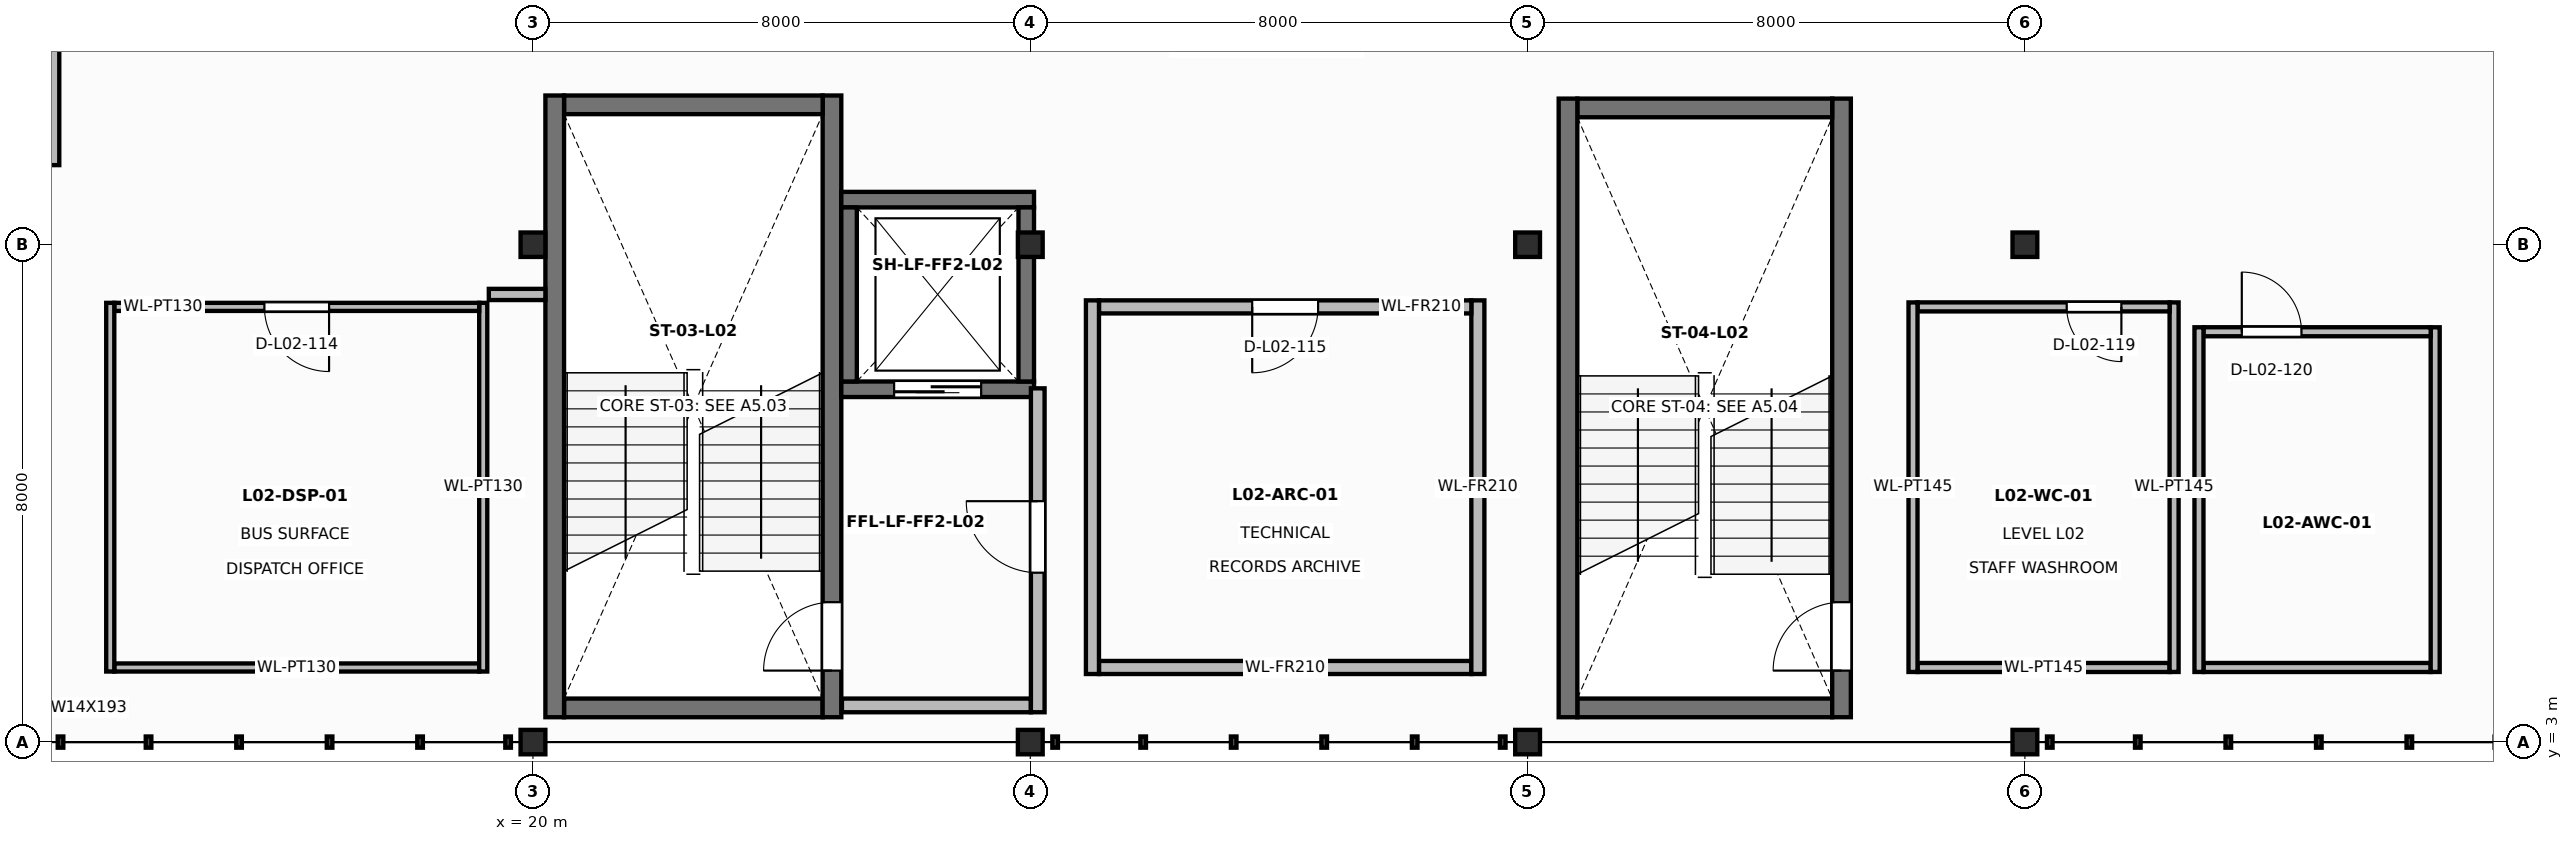
"""IFC4 building model, lengths in metres.
Left out: names, types, materials, properties, quantities, classifications, styles, units other than length and angle.
Written with IfcOpenShell. Run it as: python <this file> out.ifc"""

import sys

from ifc_helpers import new_model, si_unit, direction, frame, frame_2d, origin, origin_2d, place, context, subcontext, project, spatial, rectangle, i_section, extrude, element, fill, save


model = new_model("IFC4")
c1 = context("Model", 3, precision=1e-05, world=origin(), true_north=direction((0.0, 1.0)))
c2 = subcontext(c1, "Body", "Model", "MODEL_VIEW")
j1 = project(units=[si_unit("LENGTHUNIT", "METRE"), si_unit("PLANEANGLEUNIT", "RADIAN")], contexts=[c1])
p1 = place(None, origin())
s1 = spatial("IfcSite", under=j1, at=p1, CompositionType="ELEMENT")
p2 = place(p1, origin())
s2 = spatial("IfcBuilding", under=s1, at=p2, CompositionType="ELEMENT")
p3 = place(p2, frame((0.0, 0.0, 11.2)))
s3 = spatial("IfcBuildingStorey", under=s2, at=p3, CompositionType="ELEMENT", Elevation=11.2)
for number, where, z_axis, x_axis in (
    (1, (20.0, 3.0, 0.0), (0.0, 0.0, 1.0), (1.0, 0.0, 0.0)),
    (2, (20.0, 11.0, 0.0), (0.0, 0.0, 1.0), (1.0, 0.0, 0.0)),
    (3, (28.0, 3.0, 0.0), (0.0, 0.0, 1.0), (1.0, 0.0, 0.0)),
    (4, (28.0, 11.0, 0.0), (0.0, 0.0, 1.0), (1.0, 0.0, 0.0)),
    (5, (36.0, 3.0, 0.0), (0.0, 0.0, 1.0), (1.0, 0.0, 0.0)),
    (6, (36.0, 11.0, 0.0), (0.0, 0.0, 1.0), (1.0, 0.0, 0.0)),
    (7, (44.0, 3.0, 0.0), (0.0, 0.0, 1.0), (1.0, 0.0, 0.0)),
    (8, (44.0, 11.0, 0.0), (0.0, 0.0, 1.0), (1.0, 0.0, 0.0)),
):
    element("IfcColumn", number, at=place(p3, frame(where, z_axis=z_axis, x_axis=x_axis)), inside=s3, PredefinedType="COLUMN", context=c2, shape_type="SweptSolid", body=[
        extrude(i_section(OverallWidth=0.399, OverallDepth=0.393, WebThickness=0.023, FlangeThickness=0.037, at=origin_2d()), origin(), (0.0, 0.0, 1.0), 4.4),
    ])
p4 = place(p3, frame((20.5, 3.55, 0.0), z_axis=(0.0, 0.0, 1.0), x_axis=(1.0, 0.0, 0.0)))
e9 = element("IfcWall", 9, at=p4, inside=s3, PredefinedType="SHEAR", context=c2, shape_type="SweptSolid", body=[
    extrude(rectangle(XDim=4.16, YDim=0.3, at=frame_2d((2.08, 0.0))), origin(), (0.0, 0.0, 1.0), 4.165),
])
p5 = place(p3, frame((24.81, 3.4, 0.0), z_axis=(0.0, 0.0, 1.0), x_axis=(0.0, 1.0, 0.0)))
e10 = element("IfcWall", 10, at=p5, inside=s3, PredefinedType="SHEAR", context=c2, shape_type="SweptSolid", body=[
    extrude(rectangle(XDim=10.0, YDim=0.3, at=frame_2d((5.0, 0.0))), origin(), (0.0, 0.0, 1.0), 4.165),
])
p6 = place(p5, frame((0.75, 0.0, 0.0)))
e11 = element("IfcOpeningElement", 11, at=p6, cuts=e10, PredefinedType="OPENING", context=c2, shape_type="SweptSolid", body=[
    extrude(rectangle(XDim=1.1, YDim=2.15, at=frame_2d((0.55, 1.075))), frame((0.0, 0.16, 0.0), z_axis=(0.0, -1.0, 0.0), x_axis=(1.0, 0.0, 0.0)), (0.0, 0.0, 1.0), 0.32),
])
p7 = place(p3, frame((24.66, 13.25, 0.0), z_axis=(0.0, 0.0, 1.0), x_axis=(-1.0, 0.0, 0.0)))
e12 = element("IfcWall", 12, at=p7, inside=s3, PredefinedType="SHEAR", context=c2, shape_type="SweptSolid", body=[
    extrude(rectangle(XDim=4.16, YDim=0.3, at=frame_2d((2.08, 0.0))), origin(), (0.0, 0.0, 1.0), 4.165),
])
p8 = place(p3, frame((20.35, 13.4, 0.0), z_axis=(0.0, 0.0, 1.0), x_axis=(0.0, -1.0, 0.0)))
e13 = element("IfcWall", 13, at=p8, inside=s3, PredefinedType="SHEAR", context=c2, shape_type="SweptSolid", body=[
    extrude(rectangle(XDim=10.0, YDim=0.3, at=frame_2d((5.0, 0.0))), origin(), (0.0, 0.0, 1.0), 4.165),
])
p9 = place(p3, frame((36.8, 3.55, 0.0), z_axis=(0.0, 0.0, 1.0), x_axis=(1.0, 0.0, 0.0)))
e14 = element("IfcWall", 14, at=p9, inside=s3, PredefinedType="SHEAR", context=c2, shape_type="SweptSolid", body=[
    extrude(rectangle(XDim=4.1, YDim=0.3, at=frame_2d((2.05, 0.0))), origin(), (0.0, 0.0, 1.0), 4.165),
])
p10 = place(p3, frame((41.05, 3.4, 0.0), z_axis=(0.0, 0.0, 1.0), x_axis=(0.0, 1.0, 0.0)))
e15 = element("IfcWall", 15, at=p10, inside=s3, PredefinedType="SHEAR", context=c2, shape_type="SweptSolid", body=[
    extrude(rectangle(XDim=9.95, YDim=0.3, at=frame_2d((4.975, 0.0))), origin(), (0.0, 0.0, 1.0), 4.165),
])
p11 = place(p10, frame((0.75, 0.0, 0.0)))
e16 = element("IfcOpeningElement", 16, at=p11, cuts=e15, PredefinedType="OPENING", context=c2, shape_type="SweptSolid", body=[
    extrude(rectangle(XDim=1.1, YDim=2.15, at=frame_2d((0.55, 1.075))), frame((0.0, 0.16, 0.0), z_axis=(0.0, -1.0, 0.0), x_axis=(1.0, 0.0, 0.0)), (0.0, 0.0, 1.0), 0.32),
])
p12 = place(p3, frame((40.9, 13.2, 0.0), z_axis=(0.0, 0.0, 1.0), x_axis=(-1.0, 0.0, 0.0)))
e17 = element("IfcWall", 17, at=p12, inside=s3, PredefinedType="SHEAR", context=c2, shape_type="SweptSolid", body=[
    extrude(rectangle(XDim=4.1, YDim=0.3, at=frame_2d((2.05, 0.0))), origin(), (0.0, 0.0, 1.0), 4.165),
])
p13 = place(p3, frame((36.65, 13.35, 0.0), z_axis=(0.0, 0.0, 1.0), x_axis=(0.0, -1.0, 0.0)))
e18 = element("IfcWall", 18, at=p13, inside=s3, PredefinedType="SHEAR", context=c2, shape_type="SweptSolid", body=[
    extrude(rectangle(XDim=9.95, YDim=0.3, at=frame_2d((4.975, 0.0))), origin(), (0.0, 0.0, 1.0), 4.165),
])
p14 = place(p3, frame((12.27, 12.28, 0.0), z_axis=(0.0, 0.0, 1.0), x_axis=(0.0, 1.0, 0.0)))
e19 = element("IfcWall", 19, at=p14, inside=s3, PredefinedType="SOLIDWALL", context=c2, shape_type="SweptSolid", body=[
    extrude(rectangle(XDim=5.21, YDim=0.22, at=frame_2d((2.605, 0.0))), origin(), (0.0, 0.0, 1.0), 4.165),
])
p15 = place(p3, frame((24.96, 8.675, 0.0), z_axis=(0.0, 0.0, 1.0), x_axis=(1.0, 0.0, 0.0)))
e20 = element("IfcWall", 20, at=p15, inside=s3, PredefinedType="SOLIDWALL", context=c2, shape_type="SweptSolid", body=[
    extrude(rectangle(XDim=3.1, YDim=0.25, at=frame_2d((1.55, 0.0))), origin(), (0.0, 0.0, 1.0), 4.165),
])
p16 = place(p15, frame((0.85, 0.0, 0.0)))
e21 = element("IfcOpeningElement", 21, at=p16, cuts=e20, PredefinedType="OPENING", context=c2, shape_type="SweptSolid", body=[
    extrude(rectangle(XDim=1.4, YDim=2.25, at=frame_2d((0.7, 1.125))), frame((0.0, 0.135, 0.0), z_axis=(0.0, -1.0, 0.0), x_axis=(1.0, 0.0, 0.0)), (0.0, 0.0, 1.0), 0.27),
])
p17 = place(p3, frame((28.06, 11.725, 0.0), z_axis=(0.0, 0.0, 1.0), x_axis=(-1.0, 0.0, 0.0)))
e22 = element("IfcWall", 22, at=p17, inside=s3, PredefinedType="SOLIDWALL", context=c2, shape_type="SweptSolid", body=[
    extrude(rectangle(XDim=3.1, YDim=0.25, at=frame_2d((1.55, 0.0))), origin(), (0.0, 0.0, 1.0), 4.165),
])
for number, where, z_axis, x_axis in (
    (23, (27.935, 8.8, 0.0), (0.0, 0.0, 1.0), (0.0, 1.0, 0.0)),
    (24, (25.085, 11.6, 0.0), (0.0, 0.0, 1.0), (0.0, -1.0, 0.0)),
):
    element("IfcWall", number, at=place(p3, frame(where, z_axis=z_axis, x_axis=x_axis)), inside=s3, PredefinedType="SOLIDWALL", context=c2, shape_type="SweptSolid", body=[
        extrude(rectangle(XDim=2.8, YDim=0.25, at=frame_2d((1.4, 0.0))), origin(), (0.0, 0.0, 1.0), 4.165),
    ])
p18 = place(p3, frame((24.97, 3.59, 0.0), z_axis=(0.0, 0.0, 1.0), x_axis=(1.0, 0.0, 0.0)))
e25 = element("IfcWall", 25, at=p18, inside=s3, PredefinedType="SOLIDWALL", context=c2, shape_type="SweptSolid", body=[
    extrude(rectangle(XDim=3.04, YDim=0.22, at=frame_2d((1.52, 0.0))), origin(), (0.0, 0.0, 1.0), 4.165),
])
p19 = place(p3, frame((28.12, 3.48, 0.0), z_axis=(0.0, 0.0, 1.0), x_axis=(0.0, 1.0, 0.0)))
e26 = element("IfcWall", 26, at=p19, inside=s3, PredefinedType="SOLIDWALL", context=c2, shape_type="SweptSolid", body=[
    extrude(rectangle(XDim=5.21, YDim=0.22, at=frame_2d((2.605, 0.0))), origin(), (0.0, 0.0, 1.0), 3.547),
])
p20 = place(p19, frame((2.245, 0.0, 0.0)))
e27 = element("IfcOpeningElement", 27, at=p20, cuts=e26, PredefinedType="OPENING", context=c2, shape_type="SweptSolid", body=[
    extrude(rectangle(XDim=1.15, YDim=2.15, at=frame_2d((0.575, 1.075))), frame((0.0, 0.12, 0.0), z_axis=(0.0, -1.0, 0.0), x_axis=(1.0, 0.0, 0.0)), (0.0, 0.0, 1.0), 0.24),
])
p21 = place(p3, frame((19.29, 10.2, 0.0), z_axis=(0.0, 0.0, 1.0), x_axis=(1.0, 0.0, 0.0)))
e28 = element("IfcWall", 28, at=p21, inside=s3, PredefinedType="PARTITIONING", context=c2, shape_type="SweptSolid", body=[
    extrude(rectangle(XDim=0.91, YDim=0.18, at=frame_2d((0.455, 0.0))), origin(), (0.0, 0.0, 1.0), 3.547),
])
p22 = place(p3, frame((13.265, 4.2, 0.0), z_axis=(0.0, 0.0, 1.0), x_axis=(1.0, 0.0, 0.0)))
e29 = element("IfcWall", 29, at=p22, inside=s3, PredefinedType="PARTITIONING", context=c2, shape_type="SweptSolid", body=[
    extrude(rectangle(XDim=5.87, YDim=0.13, at=frame_2d((2.935, 0.0))), origin(), (0.0, 0.0, 1.0), 4.12),
])
p23 = place(p3, frame((19.2, 4.135, 0.0), z_axis=(0.0, 0.0, 1.0), x_axis=(0.0, 1.0, 0.0)))
e30 = element("IfcWall", 30, at=p23, inside=s3, PredefinedType="PARTITIONING", context=c2, shape_type="SweptSolid", body=[
    extrude(rectangle(XDim=5.93, YDim=0.13, at=frame_2d((2.965, 0.0))), origin(), (0.0, 0.0, 1.0), 4.12),
])
p24 = place(p3, frame((19.135, 10.0, 0.0), z_axis=(0.0, 0.0, 1.0), x_axis=(-1.0, 0.0, 0.0)))
e31 = element("IfcWall", 31, at=p24, inside=s3, PredefinedType="PARTITIONING", context=c2, shape_type="SweptSolid", body=[
    extrude(rectangle(XDim=5.87, YDim=0.13, at=frame_2d((2.935, 0.0))), origin(), (0.0, 0.0, 1.0), 4.12),
])
p25 = place(p24, frame((2.415, 0.0, 0.0)))
e32 = element("IfcOpeningElement", 32, at=p25, cuts=e31, PredefinedType="OPENING", context=c2, shape_type="SweptSolid", body=[
    extrude(rectangle(XDim=1.04, YDim=2.16, at=frame_2d((0.52, 1.08))), frame((0.0, 0.075, 0.0), z_axis=(0.0, -1.0, 0.0), x_axis=(1.0, 0.0, 0.0)), (0.0, 0.0, 1.0), 0.15),
])
p26 = place(p3, frame((13.2, 10.065, 0.0), z_axis=(0.0, 0.0, 1.0), x_axis=(0.0, -1.0, 0.0)))
e33 = element("IfcWall", 33, at=p26, inside=s3, PredefinedType="PARTITIONING", context=c2, shape_type="SweptSolid", body=[
    extrude(rectangle(XDim=5.93, YDim=0.13, at=frame_2d((2.965, 0.0))), origin(), (0.0, 0.0, 1.0), 4.12),
])
p27 = place(p3, frame((29.105, 4.2, 0.0), z_axis=(0.0, 0.0, 1.0), x_axis=(1.0, 0.0, 0.0)))
e34 = element("IfcWall", 34, at=p27, inside=s3, PredefinedType="SOLIDWALL", context=c2, shape_type="SweptSolid", body=[
    extrude(rectangle(XDim=5.99, YDim=0.21, at=frame_2d((2.995, 0.0))), origin(), (0.0, 0.0, 1.0), 4.12),
])
p28 = place(p3, frame((35.2, 4.095, 0.0), z_axis=(0.0, 0.0, 1.0), x_axis=(0.0, 1.0, 0.0)))
e35 = element("IfcWall", 35, at=p28, inside=s3, PredefinedType="SOLIDWALL", context=c2, shape_type="SweptSolid", body=[
    extrude(rectangle(XDim=6.01, YDim=0.21, at=frame_2d((3.005, 0.0))), origin(), (0.0, 0.0, 1.0), 3.811),
])
p29 = place(p3, frame((35.095, 10.0, 0.0), z_axis=(0.0, 0.0, 1.0), x_axis=(-1.0, 0.0, 0.0)))
e36 = element("IfcWall", 36, at=p29, inside=s3, PredefinedType="SOLIDWALL", context=c2, shape_type="SweptSolid", body=[
    extrude(rectangle(XDim=5.99, YDim=0.21, at=frame_2d((2.995, 0.0))), origin(), (0.0, 0.0, 1.0), 4.12),
])
p30 = place(p29, frame((2.465, 0.0, 0.0)))
e37 = element("IfcOpeningElement", 37, at=p30, cuts=e36, PredefinedType="OPENING", context=c2, shape_type="SweptSolid", body=[
    extrude(rectangle(XDim=1.06, YDim=2.16, at=frame_2d((0.53, 1.08))), frame((0.0, 0.115, 0.0), z_axis=(0.0, -1.0, 0.0), x_axis=(1.0, 0.0, 0.0)), (0.0, 0.0, 1.0), 0.23),
])
p31 = place(p3, frame((29.0, 10.105, 0.0), z_axis=(0.0, 0.0, 1.0), x_axis=(0.0, -1.0, 0.0)))
e38 = element("IfcWall", 38, at=p31, inside=s3, PredefinedType="SOLIDWALL", context=c2, shape_type="SweptSolid", body=[
    extrude(rectangle(XDim=6.01, YDim=0.21, at=frame_2d((3.005, 0.0))), origin(), (0.0, 0.0, 1.0), 3.811),
])
p32 = place(p3, frame((42.273, 4.2, 0.0), z_axis=(0.0, 0.0, 1.0), x_axis=(1.0, 0.0, 0.0)))
e39 = element("IfcWall", 39, at=p32, inside=s3, PredefinedType="PARTITIONING", context=c2, shape_type="SweptSolid", body=[
    extrude(rectangle(XDim=4.055, YDim=0.145, at=frame_2d((2.027, 0.0))), origin(), (0.0, 0.0, 1.0), 3.628),
])
p33 = place(p3, frame((46.4, 4.128, 0.0), z_axis=(0.0, 0.0, 1.0), x_axis=(0.0, 1.0, 0.0)))
e40 = element("IfcWall", 40, at=p33, inside=s3, PredefinedType="PARTITIONING", context=c2, shape_type="SweptSolid", body=[
    extrude(rectangle(XDim=5.944, YDim=0.145, at=frame_2d((2.972, 0.0))), origin(), (0.0, 0.0, 1.0), 3.811),
])
p34 = place(p3, frame((46.328, 10.0, 0.0), z_axis=(0.0, 0.0, 1.0), x_axis=(-1.0, 0.0, 0.0)))
e41 = element("IfcWall", 41, at=p34, inside=s3, PredefinedType="PARTITIONING", context=c2, shape_type="SweptSolid", body=[
    extrude(rectangle(XDim=4.055, YDim=0.145, at=frame_2d((2.027, 0.0))), origin(), (0.0, 0.0, 1.0), 3.628),
])
p35 = place(p34, frame((0.776, 0.0, 0.0)))
e42 = element("IfcOpeningElement", 42, at=p35, cuts=e41, PredefinedType="OPENING", context=c2, shape_type="SweptSolid", body=[
    extrude(rectangle(XDim=0.88, YDim=2.08, at=frame_2d((0.44, 1.04))), frame((0.0, 0.083, 0.0), z_axis=(0.0, -1.0, 0.0), x_axis=(1.0, 0.0, 0.0)), (0.0, 0.0, 1.0), 0.165),
])
p36 = place(p3, frame((42.2, 10.072, 0.0), z_axis=(0.0, 0.0, 1.0), x_axis=(0.0, -1.0, 0.0)))
e43 = element("IfcWall", 43, at=p36, inside=s3, PredefinedType="PARTITIONING", context=c2, shape_type="SweptSolid", body=[
    extrude(rectangle(XDim=5.944, YDim=0.145, at=frame_2d((2.972, 0.0))), origin(), (0.0, 0.0, 1.0), 4.12),
])
p37 = place(p3, frame((46.872, 4.2, 0.0), z_axis=(0.0, 0.0, 1.0), x_axis=(1.0, 0.0, 0.0)))
e44 = element("IfcWall", 44, at=p37, inside=s3, PredefinedType="PARTITIONING", context=c2, shape_type="SweptSolid", body=[
    extrude(rectangle(XDim=3.656, YDim=0.145, at=frame_2d((1.828, 0.0))), origin(), (0.0, 0.0, 1.0), 4.12),
])
p38 = place(p3, frame((50.6, 4.128, 0.0), z_axis=(0.0, 0.0, 1.0), x_axis=(0.0, 1.0, 0.0)))
e45 = element("IfcWall", 45, at=p38, inside=s3, PredefinedType="PARTITIONING", context=c2, shape_type="SweptSolid", body=[
    extrude(rectangle(XDim=5.544, YDim=0.145, at=frame_2d((2.772, 0.0))), origin(), (0.0, 0.0, 1.0), 3.811),
])
p39 = place(p3, frame((50.528, 9.6, 0.0), z_axis=(0.0, 0.0, 1.0), x_axis=(-1.0, 0.0, 0.0)))
e46 = element("IfcWall", 46, at=p39, inside=s3, PredefinedType="PARTITIONING", context=c2, shape_type="SweptSolid", body=[
    extrude(rectangle(XDim=3.656, YDim=0.145, at=frame_2d((1.828, 0.0))), origin(), (0.0, 0.0, 1.0), 4.12),
])
p40 = place(p39, frame((2.079, 0.0, 0.0)))
e47 = element("IfcOpeningElement", 47, at=p40, cuts=e46, PredefinedType="OPENING", context=c2, shape_type="SweptSolid", body=[
    extrude(rectangle(XDim=0.96, YDim=2.12, at=frame_2d((0.48, 1.06))), frame((0.0, 0.083, 0.0), z_axis=(0.0, -1.0, 0.0), x_axis=(1.0, 0.0, 0.0)), (0.0, 0.0, 1.0), 0.165),
])
p41 = place(p3, frame((46.8, 9.672, 0.0), z_axis=(0.0, 0.0, 1.0), x_axis=(0.0, -1.0, 0.0)))
e48 = element("IfcWall", 48, at=p41, inside=s3, PredefinedType="PARTITIONING", context=c2, shape_type="SweptSolid", body=[
    extrude(rectangle(XDim=5.544, YDim=0.145, at=frame_2d((2.772, 0.0))), origin(), (0.0, 0.0, 1.0), 3.811),
])
p42 = place(p6, origin())
e49 = element("IfcDoor", 49, at=p42, inside=s3, OperationType="SINGLE_SWING_LEFT", PredefinedType="DOOR", context=c2, shape_type="SweptSolid", body=[
    extrude(rectangle(XDim=1.1, YDim=2.15, at=frame_2d((0.55, 1.075))), frame((0.0, 0.025, 0.0), z_axis=(0.0, -1.0, 0.0), x_axis=(1.0, 0.0, 0.0)), (0.0, 0.0, 1.0), 0.05),
])
fill(e11, e49)
p43 = place(p11, origin())
e50 = element("IfcDoor", 50, at=p43, inside=s3, OperationType="SINGLE_SWING_LEFT", PredefinedType="DOOR", context=c2, shape_type="SweptSolid", body=[
    extrude(rectangle(XDim=1.1, YDim=2.15, at=frame_2d((0.55, 1.075))), frame((0.0, 0.025, 0.0), z_axis=(0.0, -1.0, 0.0), x_axis=(1.0, 0.0, 0.0)), (0.0, 0.0, 1.0), 0.05),
])
fill(e16, e50)
p44 = place(p16, frame((1.4, 0.0, 0.0), z_axis=(0.0, 0.0, 1.0), x_axis=(-1.0, 0.0, 0.0)))
e51 = element("IfcDoor", 51, at=p44, inside=s3, OperationType="DOUBLE_DOOR_SLIDING", PredefinedType="DOOR", context=c2, shape_type="SweptSolid", body=[
    extrude(rectangle(XDim=1.4, YDim=2.25, at=frame_2d((0.7, 1.125))), frame((0.0, 0.025, 0.0), z_axis=(0.0, -1.0, 0.0), x_axis=(1.0, 0.0, 0.0)), (0.0, 0.0, 1.0), 0.05),
])
fill(e21, e51)
p45 = place(p20, origin())
e52 = element("IfcDoor", 52, at=p45, inside=s3, OperationType="SINGLE_SWING_RIGHT", PredefinedType="DOOR", context=c2, shape_type="SweptSolid", body=[
    extrude(rectangle(XDim=1.15, YDim=2.15, at=frame_2d((0.575, 1.075))), frame((0.0, 0.025, 0.0), z_axis=(0.0, -1.0, 0.0), x_axis=(1.0, 0.0, 0.0)), (0.0, 0.0, 1.0), 0.05),
])
fill(e27, e52)
p46 = place(p25, origin())
e53 = element("IfcDoor", 53, at=p46, inside=s3, OperationType="SINGLE_SWING_LEFT", PredefinedType="DOOR", context=c2, shape_type="SweptSolid", body=[
    extrude(rectangle(XDim=1.04, YDim=2.16, at=frame_2d((0.52, 1.08))), frame((0.0, 0.025, 0.0), z_axis=(0.0, -1.0, 0.0), x_axis=(1.0, 0.0, 0.0)), (0.0, 0.0, 1.0), 0.05),
])
fill(e32, e53)
p47 = place(p30, origin())
e54 = element("IfcDoor", 54, at=p47, inside=s3, OperationType="SINGLE_SWING_RIGHT", PredefinedType="DOOR", context=c2, shape_type="SweptSolid", body=[
    extrude(rectangle(XDim=1.06, YDim=2.16, at=frame_2d((0.53, 1.08))), frame((0.0, 0.025, 0.0), z_axis=(0.0, -1.0, 0.0), x_axis=(1.0, 0.0, 0.0)), (0.0, 0.0, 1.0), 0.05),
])
fill(e37, e54)
p48 = place(p35, origin())
e55 = element("IfcDoor", 55, at=p48, inside=s3, OperationType="SINGLE_SWING_LEFT", PredefinedType="DOOR", context=c2, shape_type="SweptSolid", body=[
    extrude(rectangle(XDim=0.88, YDim=2.08, at=frame_2d((0.44, 1.04))), frame((0.0, 0.025, 0.0), z_axis=(0.0, -1.0, 0.0), x_axis=(1.0, 0.0, 0.0)), (0.0, 0.0, 1.0), 0.05),
])
fill(e42, e55)
p49 = place(p40, frame((0.96, 0.0, 0.0), z_axis=(0.0, 0.0, 1.0), x_axis=(-1.0, 0.0, 0.0)))
e56 = element("IfcDoor", 56, at=p49, inside=s3, OperationType="SINGLE_SWING_RIGHT", PredefinedType="DOOR", context=c2, shape_type="SweptSolid", body=[
    extrude(rectangle(XDim=0.96, YDim=2.12, at=frame_2d((0.48, 1.06))), frame((0.0, 0.025, 0.0), z_axis=(0.0, -1.0, 0.0), x_axis=(1.0, 0.0, 0.0)), (0.0, 0.0, 1.0), 0.05),
])
fill(e47, e56)
save(model, sys.argv[1])
